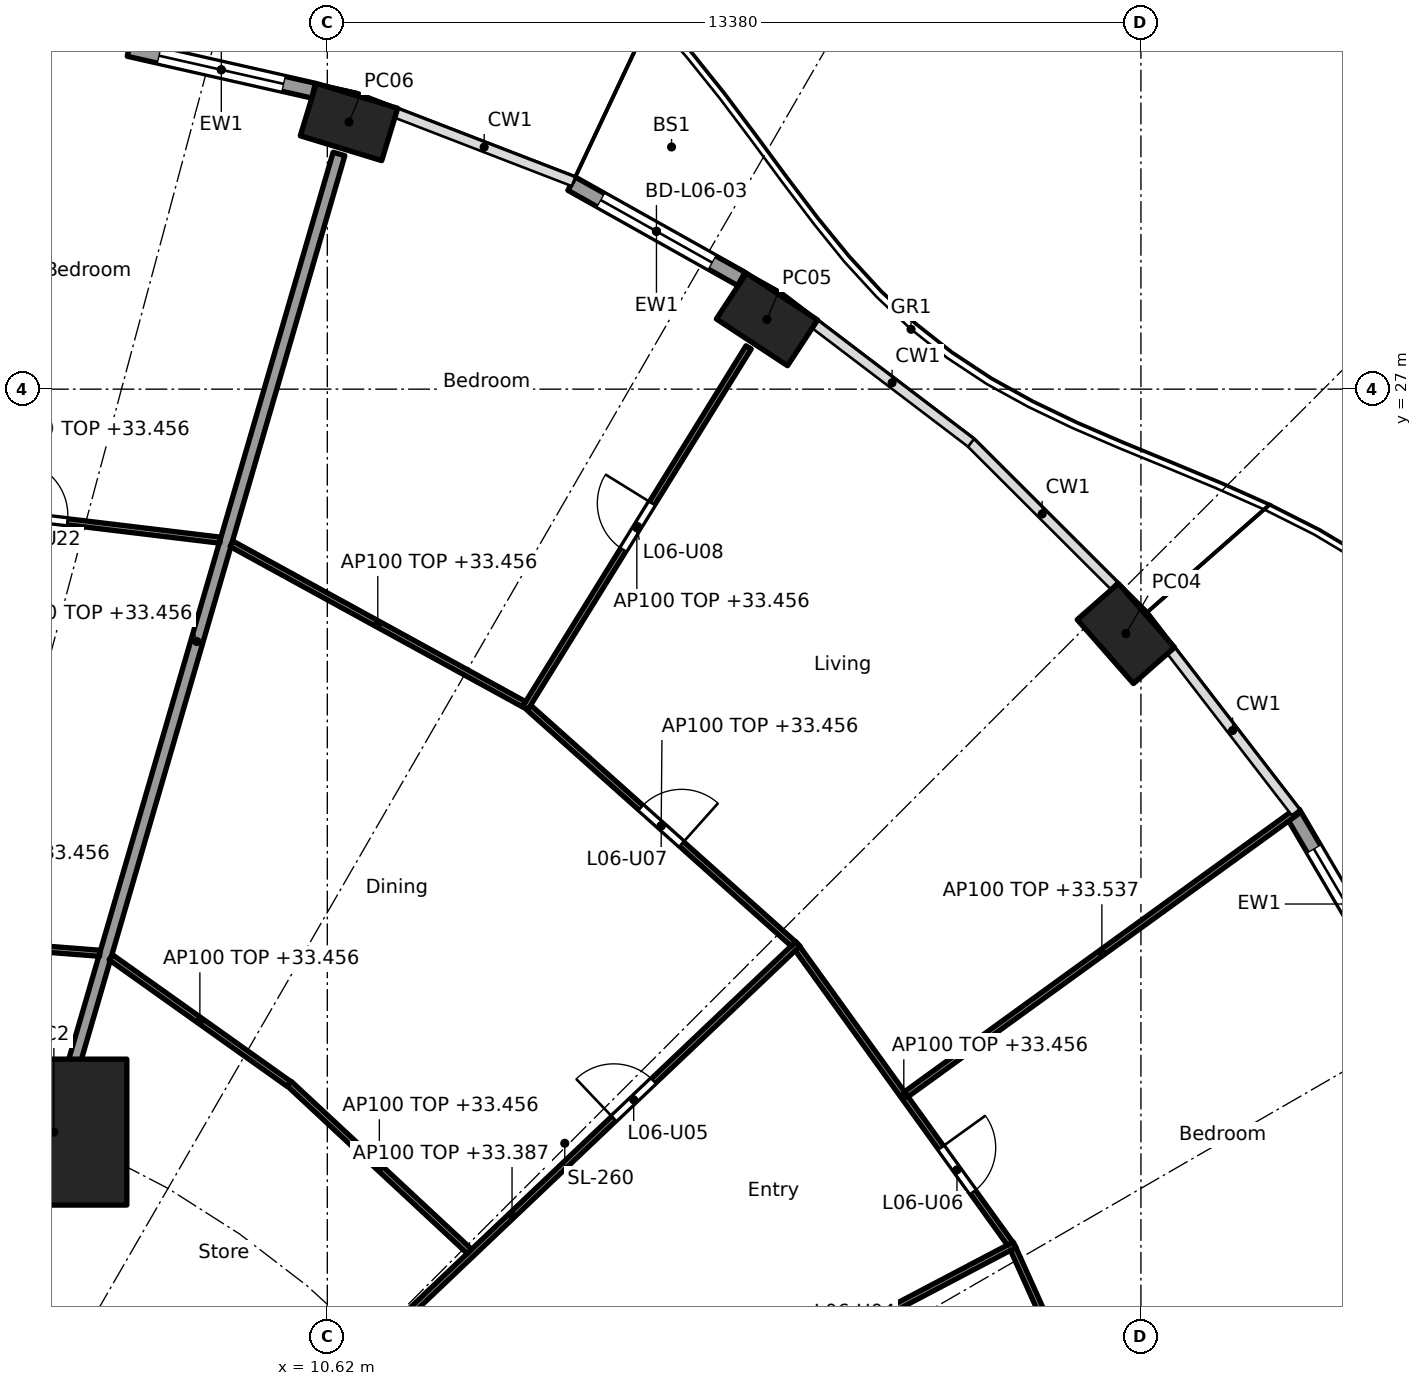
"""IFC4 building model, lengths in metres.
Left out: names, types, materials, properties, quantities, classifications, styles, units other than length and angle.
Written with IfcOpenShell. Run it as: python <this file> out.ifc"""

import sys

from ifc_helpers import new_model, si_unit, direction, frame, frame_2d, origin, origin_2d, place, context, subcontext, project, spatial, rectangle, hollow_rectangle, extrude, element, fill, save


model = new_model("IFC4")
c1 = context("Model", 3, precision=1e-05, world=origin(), true_north=direction((0.0, 1.0)))
c2 = subcontext(c1, "Body", "Model", "MODEL_VIEW")
j1 = project(units=[si_unit("LENGTHUNIT", "METRE"), si_unit("PLANEANGLEUNIT", "RADIAN")], contexts=[c1])
p1 = place(None, origin())
s1 = spatial("IfcSite", under=j1, at=p1, CompositionType="ELEMENT")
p2 = place(p1, origin())
s2 = spatial("IfcBuilding", under=s1, at=p2, CompositionType="ELEMENT")
p3 = place(p2, frame((0.0, 0.0, 30.7)))
s3 = spatial("IfcBuildingStorey", under=s2, at=p3, CompositionType="ELEMENT", Elevation=30.7)
for number, where, z_axis, x_axis in (
    (1, (23.752, 22.981, 0.0), (0.0, 0.0, 1.0), (-0.66, 0.751, 0.0)),
    (2, (17.85, 28.146, 0.0), (0.0, 0.0, 1.0), (-0.836, 0.549, 0.0)),
    (3, (10.976, 31.393, 0.0), (0.0, 0.0, 1.0), (-0.957, 0.292, 0.0)),
):
    element("IfcColumn", number, at=place(p3, frame(where, z_axis=z_axis, x_axis=x_axis)), inside=s3, PredefinedType="COLUMN", context=c2, shape_type="SweptSolid", body=[
        extrude(hollow_rectangle(XDim=1.4, YDim=0.9, WallThickness=0.05, at=origin_2d()), origin(), (0.0, 0.0, 1.0), 3.7),
    ])
p4 = place(p3, frame((6.123, 14.782, 0.0), z_axis=(0.0, 0.0, 1.0), x_axis=(1.0, 0.0, 0.0)))
e4 = element("IfcColumn", 4, at=p4, inside=s3, PredefinedType="COLUMN", context=c2, shape_type="SweptSolid", body=[
    extrude(rectangle(XDim=2.4, YDim=2.4, at=origin_2d()), origin(), (0.0, 0.0, 1.0), 3.7),
])
p5 = place(p3, frame((26.5, 20.026, 0.0), z_axis=(0.0, 0.0, 1.0), x_axis=(0.506311160839, -0.862350861546, 0.0)))
e5 = element("IfcWall", 5, at=p5, inside=s3, PredefinedType="SOLIDWALL", context=c2, shape_type="SweptSolid", body=[
    extrude(rectangle(XDim=3.462, YDim=0.25, at=frame_2d((1.731, 0.0))), origin(), (0.0, 0.0, 1.0), 3.44),
])
p6 = place(p5, frame((0.681, 0.0, 0.0)))
e6 = element("IfcOpeningElement", 6, at=p6, cuts=e5, PredefinedType="OPENING", context=c2, shape_type="SweptSolid", body=[
    extrude(rectangle(XDim=2.1, YDim=2.4, at=frame_2d((1.05, 1.2))), frame((0.0, 0.135, 0.0), z_axis=(0.0, -1.0, 0.0), x_axis=(1.0, 0.0, 0.0)), (0.0, 0.0, 1.0), 0.27),
])
p7 = place(p3, frame((14.637, 30.379, 0.0), z_axis=(0.0, 0.0, 1.0), x_axis=(0.872102558443, -0.489323132048, 0.0)))
e7 = element("IfcWall", 7, at=p7, inside=s3, PredefinedType="SOLIDWALL", context=c2, shape_type="SweptSolid", body=[
    extrude(rectangle(XDim=3.201, YDim=0.25, at=frame_2d((1.601, 0.0))), origin(), (0.0, 0.0, 1.0), 3.44),
])
p8 = place(p7, frame((0.551, 0.0, 0.0)))
e8 = element("IfcOpeningElement", 8, at=p8, cuts=e7, PredefinedType="OPENING", context=c2, shape_type="SweptSolid", body=[
    extrude(rectangle(XDim=2.1, YDim=2.4, at=frame_2d((1.05, 1.2))), frame((0.0, 0.135, 0.0), z_axis=(0.0, -1.0, 0.0), x_axis=(1.0, 0.0, 0.0)), (0.0, 0.0, 1.0), 0.27),
])
p9 = place(p3, frame((7.358, 32.596, 0.0), z_axis=(0.0, 0.0, 1.0), x_axis=(0.97533495413, -0.220729987208, 0.0)))
e9 = element("IfcWall", 9, at=p9, inside=s3, PredefinedType="SOLIDWALL", context=c2, shape_type="SweptSolid", body=[
    extrude(rectangle(XDim=3.115, YDim=0.25, at=frame_2d((1.557, 0.0))), origin(), (0.0, 0.0, 1.0), 3.44),
])
p10 = place(p9, frame((0.507, 0.0, 0.0)))
e10 = element("IfcOpeningElement", 10, at=p10, cuts=e9, PredefinedType="OPENING", context=c2, shape_type="SweptSolid", body=[
    extrude(rectangle(XDim=2.1, YDim=2.4, at=frame_2d((1.05, 1.2))), frame((0.0, 0.135, 0.0), z_axis=(0.0, -1.0, 0.0), x_axis=(1.0, 0.0, 0.0)), (0.0, 0.0, 1.0), 0.27),
])
p11 = place(p3, frame((5.243, 12.657, 0.0), z_axis=(0.0, 0.0, 1.0), x_axis=(0.382707856524, 0.923869415315, 0.0)))
e11 = element("IfcWall", 11, at=p11, inside=s3, PredefinedType="PARTITIONING", context=c2, shape_type="SweptSolid", body=[
    extrude(rectangle(XDim=2.2, YDim=0.2, at=frame_2d((1.1, 0.0))), origin(), (0.0, 0.0, 1.0), 3.44),
])
p12 = place(p3, frame((6.137, 14.83, 0.0), z_axis=(0.0, 0.0, 1.0), x_axis=(0.27985745069, 0.960041565399, 0.0)))
e12 = element("IfcWall", 12, at=p12, inside=s3, PredefinedType="PARTITIONING", context=c2, shape_type="SweptSolid", body=[
    extrude(rectangle(XDim=16.705, YDim=0.2, at=frame_2d((8.353, 0.0))), origin(), (0.0, 0.0, 1.0), 2.756),
])
p13 = place(p3, frame((12.635, 5.134, 0.0), z_axis=(0.0, 0.0, 1.0), x_axis=(-0.707106781187, 0.707106781187, 0.0)))
e13 = element("IfcWall", 13, at=p13, inside=s3, PredefinedType="PARTITIONING", context=c2, shape_type="SweptSolid", body=[
    extrude(rectangle(XDim=10.609, YDim=0.2, at=frame_2d((5.305, 0.0))), origin(), (0.0, 0.0, 1.0), 3.44),
])
p14 = place(p13, frame((3.503, 0.0, 0.0)))
e14 = element("IfcOpeningElement", 14, at=p14, cuts=e13, PredefinedType="OPENING", context=c2, shape_type="SweptSolid", body=[
    extrude(rectangle(XDim=1.0, YDim=2.1, at=frame_2d((0.5, 1.05))), frame((0.0, 0.11, 0.0), z_axis=(0.0, -1.0, 0.0), x_axis=(1.0, 0.0, 0.0)), (0.0, 0.0, 1.0), 0.22),
])
p15 = place(p3, frame((24.293, 7.538, 0.0), z_axis=(0.0, 0.0, 1.0), x_axis=(-0.410197710154, 0.911996622025, 0.0)))
e15 = element("IfcWall", 15, at=p15, inside=s3, PredefinedType="PARTITIONING", context=c2, shape_type="SweptSolid", body=[
    extrude(rectangle(XDim=5.837, YDim=0.1, at=frame_2d((2.918, 0.0))), origin(), (0.0, 0.0, 1.0), 2.756),
])
p16 = place(p3, frame((16.635, 8.078, 0.0), z_axis=(0.0, 0.0, 1.0), x_axis=(0.949412285442, 0.314032342684, 0.0)))
e16 = element("IfcWall", 16, at=p16, inside=s3, PredefinedType="PARTITIONING", context=c2, shape_type="SweptSolid", body=[
    extrude(rectangle(XDim=14.451, YDim=0.1, at=frame_2d((7.226, 0.0))), origin(), (0.0, 0.0, 1.0), 2.837),
])
p17 = place(p3, frame((10.813, 7.091, 0.0), z_axis=(0.0, 0.0, 1.0), x_axis=(0.885182649479, 0.465243674928, 0.0)))
e17 = element("IfcWall", 17, at=p17, inside=s3, PredefinedType="PARTITIONING", context=c2, shape_type="SweptSolid", body=[
    extrude(rectangle(XDim=12.551, YDim=0.1, at=frame_2d((6.275, 0.0))), origin(), (0.0, 0.0, 1.0), 2.687),
])
p18 = place(p17, frame((0.539, 0.0, 0.0)))
e18 = element("IfcOpeningElement", 18, at=p18, cuts=e17, PredefinedType="OPENING", context=c2, shape_type="SweptSolid", body=[
    extrude(rectangle(XDim=0.9, YDim=2.1, at=frame_2d((0.45, 1.05))), frame((0.0, 0.06, 0.0), z_axis=(0.0, -1.0, 0.0), x_axis=(1.0, 0.0, 0.0)), (0.0, 0.0, 1.0), 0.12),
])
p19 = place(p17, frame((8.494, 0.0, 0.0)))
e19 = element("IfcOpeningElement", 19, at=p19, cuts=e17, PredefinedType="OPENING", context=c2, shape_type="SweptSolid", body=[
    extrude(rectangle(XDim=0.9, YDim=2.1, at=frame_2d((0.45, 1.05))), frame((0.0, 0.06, 0.0), z_axis=(0.0, -1.0, 0.0), x_axis=(1.0, 0.0, 0.0)), (0.0, 0.0, 1.0), 0.12),
])
p20 = place(p3, frame((21.849, 12.948, 0.0), z_axis=(0.0, 0.0, 1.0), x_axis=(-0.584563700282, 0.811347817099, 0.0)))
e20 = element("IfcWall", 20, at=p20, inside=s3, PredefinedType="PARTITIONING", context=c2, shape_type="SweptSolid", body=[
    extrude(rectangle(XDim=5.984, YDim=0.1, at=frame_2d((2.992, 0.0))), origin(), (0.0, 0.0, 1.0), 2.756),
])
p21 = place(p20, frame((1.046, 0.0, 0.0)))
e21 = element("IfcOpeningElement", 21, at=p21, cuts=e20, PredefinedType="OPENING", context=c2, shape_type="SweptSolid", body=[
    extrude(rectangle(XDim=0.9, YDim=2.1, at=frame_2d((0.45, 1.05))), frame((0.0, 0.06, 0.0), z_axis=(0.0, -1.0, 0.0), x_axis=(1.0, 0.0, 0.0)), (0.0, 0.0, 1.0), 0.12),
])
p22 = place(p3, frame((20.141, 15.405, 0.0), z_axis=(0.0, 0.0, 1.0), x_axis=(0.809834895779, 0.58665785734, 0.0)))
e22 = element("IfcWall", 22, at=p22, inside=s3, PredefinedType="PARTITIONING", context=c2, shape_type="SweptSolid", body=[
    extrude(rectangle(XDim=7.945, YDim=0.1, at=frame_2d((3.973, 0.0))), origin(), (0.0, 0.0, 1.0), 2.837),
])
p23 = place(p3, frame((8.957, 8.953, 0.0), z_axis=(0.0, 0.0, 1.0), x_axis=(0.725250022034, 0.688485588476, 0.0)))
e23 = element("IfcWall", 23, at=p23, inside=s3, PredefinedType="PARTITIONING", context=c2, shape_type="SweptSolid", body=[
    extrude(rectangle(XDim=12.963, YDim=0.1, at=frame_2d((6.481, 0.0))), origin(), (0.0, 0.0, 1.0), 2.687),
])
p24 = place(p23, frame((2.333, 0.0, 0.0)))
e24 = element("IfcOpeningElement", 24, at=p24, cuts=e23, PredefinedType="OPENING", context=c2, shape_type="SweptSolid", body=[
    extrude(rectangle(XDim=0.9, YDim=2.1, at=frame_2d((0.45, 1.05))), frame((0.0, 0.06, 0.0), z_axis=(0.0, -1.0, 0.0), x_axis=(1.0, 0.0, 0.0)), (0.0, 0.0, 1.0), 0.12),
])
p25 = place(p23, frame((8.79, 0.0, 0.0)))
e25 = element("IfcOpeningElement", 25, at=p25, cuts=e23, PredefinedType="OPENING", context=c2, shape_type="SweptSolid", body=[
    extrude(rectangle(XDim=0.9, YDim=2.1, at=frame_2d((0.45, 1.05))), frame((0.0, 0.06, 0.0), z_axis=(0.0, -1.0, 0.0), x_axis=(1.0, 0.0, 0.0)), (0.0, 0.0, 1.0), 0.12),
])
p26 = place(p3, frame((12.958, 12.82, 0.0), z_axis=(0.0, 0.0, 1.0), x_axis=(-0.732028724098, 0.681273768096, 0.0)))
e26 = element("IfcWall", 26, at=p26, inside=s3, PredefinedType="PARTITIONING", context=c2, shape_type="SweptSolid", body=[
    extrude(rectangle(XDim=4.05, YDim=0.1, at=frame_2d((2.025, 0.0))), origin(), (0.0, 0.0, 1.0), 2.756),
])
p27 = place(p3, frame((18.285, 17.877, 0.0), z_axis=(0.0, 0.0, 1.0), x_axis=(-0.745806142791, 0.666163041136, 0.0)))
e27 = element("IfcWall", 27, at=p27, inside=s3, PredefinedType="PARTITIONING", context=c2, shape_type="SweptSolid", body=[
    extrude(rectangle(XDim=5.831, YDim=0.1, at=frame_2d((2.915, 0.0))), origin(), (0.0, 0.0, 1.0), 2.756),
])
p28 = place(p27, frame((2.465, 0.0, 0.0)))
e28 = element("IfcOpeningElement", 28, at=p28, cuts=e27, PredefinedType="OPENING", context=c2, shape_type="SweptSolid", body=[
    extrude(rectangle(XDim=0.9, YDim=2.1, at=frame_2d((0.45, 1.05))), frame((0.0, 0.06, 0.0), z_axis=(0.0, -1.0, 0.0), x_axis=(1.0, 0.0, 0.0)), (0.0, 0.0, 1.0), 0.12),
])
p29 = place(p3, frame((9.989, 15.574, 0.0), z_axis=(0.0, 0.0, 1.0), x_axis=(-0.81492039338, 0.57957290521, 0.0)))
e29 = element("IfcWall", 29, at=p29, inside=s3, PredefinedType="PARTITIONING", context=c2, shape_type="SweptSolid", body=[
    extrude(rectangle(XDim=3.594, YDim=0.1, at=frame_2d((1.797, 0.0))), origin(), (0.0, 0.0, 1.0), 2.756),
])
p30 = place(p3, frame((13.873, 21.752, 0.0), z_axis=(0.0, 0.0, 1.0), x_axis=(0.52644491616, 0.850209239099, 0.0)))
e30 = element("IfcWall", 30, at=p30, inside=s3, PredefinedType="PARTITIONING", context=c2, shape_type="SweptSolid", body=[
    extrude(rectangle(XDim=6.98, YDim=0.1, at=frame_2d((3.49, 0.0))), origin(), (0.0, 0.0, 1.0), 2.756),
])
p31 = place(p30, frame((3.065, 0.0, 0.0)))
e31 = element("IfcOpeningElement", 31, at=p31, cuts=e30, PredefinedType="OPENING", context=c2, shape_type="SweptSolid", body=[
    extrude(rectangle(XDim=0.9, YDim=2.1, at=frame_2d((0.45, 1.05))), frame((0.0, 0.06, 0.0), z_axis=(0.0, -1.0, 0.0), x_axis=(1.0, 0.0, 0.0)), (0.0, 0.0, 1.0), 0.12),
])
p32 = place(p3, frame((13.855, 21.818, 0.0), z_axis=(0.0, 0.0, 1.0), x_axis=(-0.876809987787, 0.480837025734, 0.0)))
e32 = element("IfcWall", 32, at=p32, inside=s3, PredefinedType="PARTITIONING", context=c2, shape_type="SweptSolid", body=[
    extrude(rectangle(XDim=5.486, YDim=0.1, at=frame_2d((2.743, 0.0))), origin(), (0.0, 0.0, 1.0), 2.756),
])
p33 = place(p3, frame((6.878, 17.723, 0.0), z_axis=(0.0, 0.0, 1.0), x_axis=(-0.99701850123, 0.077162868047, 0.0)))
e33 = element("IfcWall", 33, at=p33, inside=s3, PredefinedType="PARTITIONING", context=c2, shape_type="SweptSolid", body=[
    extrude(rectangle(XDim=4.604, YDim=0.1, at=frame_2d((2.302, 0.0))), origin(), (0.0, 0.0, 1.0), 2.756),
])
p34 = place(p33, frame((1.852, 0.0, 0.0)))
e34 = element("IfcOpeningElement", 34, at=p34, cuts=e33, PredefinedType="OPENING", context=c2, shape_type="SweptSolid", body=[
    extrude(rectangle(XDim=0.9, YDim=2.1, at=frame_2d((0.45, 1.05))), frame((0.0, 0.06, 0.0), z_axis=(0.0, -1.0, 0.0), x_axis=(1.0, 0.0, 0.0)), (0.0, 0.0, 1.0), 0.12),
])
p35 = place(p3, frame((8.858, 24.516, 0.0), z_axis=(0.0, 0.0, 1.0), x_axis=(-0.992834127896, 0.119500604542, 0.0)))
e35 = element("IfcWall", 35, at=p35, inside=s3, PredefinedType="PARTITIONING", context=c2, shape_type="SweptSolid", body=[
    extrude(rectangle(XDim=5.959, YDim=0.1, at=frame_2d((2.98, 0.0))), origin(), (0.0, 0.0, 1.0), 2.756),
])
p36 = place(p35, frame((2.53, 0.0, 0.0)))
e36 = element("IfcOpeningElement", 36, at=p36, cuts=e35, PredefinedType="OPENING", context=c2, shape_type="SweptSolid", body=[
    extrude(rectangle(XDim=0.9, YDim=2.1, at=frame_2d((0.45, 1.05))), frame((0.0, 0.06, 0.0), z_axis=(0.0, -1.0, 0.0), x_axis=(1.0, 0.0, 0.0)), (0.0, 0.0, 1.0), 0.12),
])
p37 = place(p6, origin())
e37 = element("IfcDoor", 37, at=p37, inside=s3, OperationType="SLIDING_TO_LEFT", PredefinedType="DOOR", context=c2, shape_type="SweptSolid", body=[
    extrude(rectangle(XDim=2.1, YDim=2.4, at=frame_2d((1.05, 1.2))), frame((0.0, 0.025, 0.0), z_axis=(0.0, -1.0, 0.0), x_axis=(1.0, 0.0, 0.0)), (0.0, 0.0, 1.0), 0.05),
])
fill(e6, e37)
p38 = place(p8, origin())
e38 = element("IfcDoor", 38, at=p38, inside=s3, OperationType="SLIDING_TO_LEFT", PredefinedType="DOOR", context=c2, shape_type="SweptSolid", body=[
    extrude(rectangle(XDim=2.1, YDim=2.4, at=frame_2d((1.05, 1.2))), frame((0.0, 0.025, 0.0), z_axis=(0.0, -1.0, 0.0), x_axis=(1.0, 0.0, 0.0)), (0.0, 0.0, 1.0), 0.05),
])
fill(e8, e38)
p39 = place(p10, origin())
e39 = element("IfcDoor", 39, at=p39, inside=s3, OperationType="SLIDING_TO_LEFT", PredefinedType="DOOR", context=c2, shape_type="SweptSolid", body=[
    extrude(rectangle(XDim=2.1, YDim=2.4, at=frame_2d((1.05, 1.2))), frame((0.0, 0.025, 0.0), z_axis=(0.0, -1.0, 0.0), x_axis=(1.0, 0.0, 0.0)), (0.0, 0.0, 1.0), 0.05),
])
fill(e10, e39)
p40 = place(p25, origin())
e40 = element("IfcDoor", 40, at=p40, inside=s3, OperationType="SINGLE_SWING_LEFT", PredefinedType="DOOR", context=c2, shape_type="SweptSolid", body=[
    extrude(rectangle(XDim=0.9, YDim=2.1, at=frame_2d((0.45, 1.05))), frame((0.0, 0.025, 0.0), z_axis=(0.0, -1.0, 0.0), x_axis=(1.0, 0.0, 0.0)), (0.0, 0.0, 1.0), 0.05),
])
fill(e25, e40)
p41 = place(p21, frame((0.9, 0.0, 0.0), x_axis=(-1.0, 0.0, 0.0)))
e41 = element("IfcDoor", 41, at=p41, inside=s3, OperationType="SINGLE_SWING_LEFT", PredefinedType="DOOR", context=c2, shape_type="SweptSolid", body=[
    extrude(rectangle(XDim=0.9, YDim=2.1, at=frame_2d((0.45, 1.05))), frame((0.0, 0.025, 0.0), z_axis=(0.0, -1.0, 0.0), x_axis=(1.0, 0.0, 0.0)), (0.0, 0.0, 1.0), 0.05),
])
fill(e21, e41)
p42 = place(p28, frame((0.9, 0.0, 0.0), x_axis=(-1.0, 0.0, 0.0)))
e42 = element("IfcDoor", 42, at=p42, inside=s3, OperationType="SINGLE_SWING_RIGHT", PredefinedType="DOOR", context=c2, shape_type="SweptSolid", body=[
    extrude(rectangle(XDim=0.9, YDim=2.1, at=frame_2d((0.45, 1.05))), frame((0.0, 0.025, 0.0), z_axis=(0.0, -1.0, 0.0), x_axis=(1.0, 0.0, 0.0)), (0.0, 0.0, 1.0), 0.05),
])
fill(e28, e42)
p43 = place(p31, origin())
e43 = element("IfcDoor", 43, at=p43, inside=s3, OperationType="SINGLE_SWING_RIGHT", PredefinedType="DOOR", context=c2, shape_type="SweptSolid", body=[
    extrude(rectangle(XDim=0.9, YDim=2.1, at=frame_2d((0.45, 1.05))), frame((0.0, 0.025, 0.0), z_axis=(0.0, -1.0, 0.0), x_axis=(1.0, 0.0, 0.0)), (0.0, 0.0, 1.0), 0.05),
])
fill(e31, e43)
p44 = place(p36, frame((0.9, 0.0, 0.0), x_axis=(-1.0, 0.0, 0.0)))
e44 = element("IfcDoor", 44, at=p44, inside=s3, OperationType="SINGLE_SWING_LEFT", PredefinedType="DOOR", context=c2, shape_type="SweptSolid", body=[
    extrude(rectangle(XDim=0.9, YDim=2.1, at=frame_2d((0.45, 1.05))), frame((0.0, 0.025, 0.0), z_axis=(0.0, -1.0, 0.0), x_axis=(1.0, 0.0, 0.0)), (0.0, 0.0, 1.0), 0.05),
])
fill(e36, e44)
save(model, sys.argv[1])
